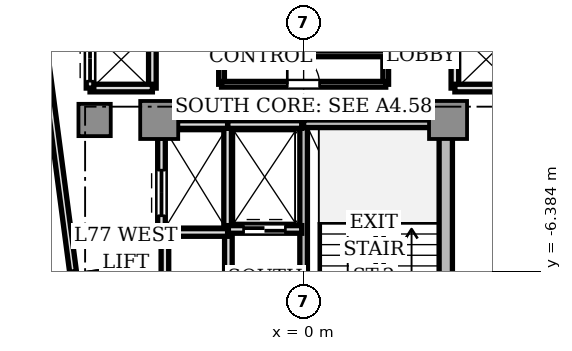
"""IFC4 building model, lengths in metres.
Left out: names, types, materials, properties, quantities, classifications, styles, units other than length and angle.
Written with IfcOpenShell. Run it as: python <this file> out.ifc"""

import sys

from ifc_helpers import new_model, si_unit, direction, frame, frame_2d, origin, origin_2d, place, context, subcontext, project, spatial, rectangle, extrude, source, transform, mapped, element, fill, save


model = new_model("IFC4")
c1 = context("Model", 3, precision=1e-05, world=origin(), true_north=direction((0.0, 1.0)))
c2 = subcontext(c1, "Body", "Model", "MODEL_VIEW")
j1 = project(units=[si_unit("LENGTHUNIT", "METRE"), si_unit("PLANEANGLEUNIT", "RADIAN")], contexts=[c1])
p1 = place(None, origin())
s1 = spatial("IfcSite", under=j1, at=p1, CompositionType="ELEMENT")
p2 = place(p1, origin())
s2 = spatial("IfcBuilding", under=s1, at=p2, CompositionType="ELEMENT")
p3 = place(p2, frame((0.0, 0.0, 275.8)))
s3 = spatial("IfcBuildingStorey", under=s2, at=p3, CompositionType="ELEMENT", Elevation=275.8)
p4 = place(p3, frame((3.74, -9.75, 0.0), z_axis=(0.0, 0.0, 1.0), x_axis=(0.0, 1.0, 0.0)))
e1 = element("IfcWall", 1, at=p4, inside=s3, PredefinedType="SHEAR", context=c2, shape_type="SweptSolid", body=[
    extrude(rectangle(XDim=6.9, YDim=0.35, at=frame_2d((3.45, 0.0))), origin(), (0.0, 0.0, 1.0), 4.1),
])
m1 = source(origin(), c2, "Body", "SweptSolid", [
    extrude(rectangle(XDim=1.0, YDim=1.0, at=origin_2d()), origin(), (0.0, 0.0, 1.0), 4.1),
])
for number, where, z_axis, x_axis in (
    (2, (-3.8, -2.4, 0.0), (0.0, 0.0, 1.0), (1.0, 0.0, 0.0)),
    (3, (3.8, -2.4, 0.0), (0.0, 0.0, 1.0), (1.0, 0.0, 0.0)),
):
    element("IfcColumn", number, at=place(p3, frame(where, z_axis=z_axis, x_axis=x_axis)), inside=s3, PredefinedType="COLUMN", context=c2, shape_type="MappedRepresentation", body=[
        mapped(m1, transform((0.0, 0.0, 0.0), scale=1.0)),
    ])
m2 = source(origin(), c2, "Body", "SweptSolid", [
    extrude(rectangle(XDim=0.85, YDim=0.85, at=origin_2d()), origin(), (0.0, 0.0, 1.0), 4.1),
])
p5 = place(p3, frame((-5.5, -2.4, 0.0), z_axis=(0.0, 0.0, 1.0), x_axis=(1.0, 0.0, 0.0)))
e4 = element("IfcColumn", 4, at=p5, inside=s3, PredefinedType="COLUMN", context=c2, shape_type="MappedRepresentation", body=[
    mapped(m2, transform((0.0, 0.0, 0.0), scale=1.0)),
])
p6 = place(p3, frame((-4.821, -6.283, 0.0), z_axis=(0.0, 0.0, 1.0), x_axis=(0.130475563272, -0.991451525486, 0.0)))
e5 = element("IfcWall", 5, at=p6, inside=s3, PredefinedType="STANDARD", context=c2, shape_type="SweptSolid", body=[
    extrude(rectangle(XDim=2.7, YDim=0.22, at=frame_2d((1.35, 0.0))), origin(), (0.0, 0.0, 1.0), 4.1),
])
p7 = place(p6, frame((1.4, 0.0, 0.0)))
e6 = element("IfcOpeningElement", 6, at=p7, cuts=e5, PredefinedType="OPENING", context=c2, shape_type="SweptSolid", body=[
    extrude(rectangle(XDim=1.0, YDim=2.2, at=frame_2d((0.5, 1.1))), frame((0.0, 0.12, 0.0), z_axis=(0.0, -1.0, 0.0), x_axis=(1.0, 0.0, 0.0)), (0.0, 0.0, 1.0), 0.24),
])
p8 = place(p3, frame((0.0, -10.18, 0.0), z_axis=(0.0, 0.0, 1.0), x_axis=(0.0, 1.0, 0.0)))
e7 = element("IfcWall", 7, at=p8, inside=s3, PredefinedType="SOLIDWALL", context=c2, shape_type="SweptSolid", body=[
    extrude(rectangle(XDim=7.68, YDim=0.2, at=frame_2d((3.84, 0.0))), origin(), (0.0, 0.0, 1.0), 4.1),
])
p9 = place(p8, frame((0.28, 0.0, 0.0)))
e8 = element("IfcOpeningElement", 8, at=p9, cuts=e7, PredefinedType="OPENING", context=c2, shape_type="SweptSolid", body=[
    extrude(rectangle(XDim=1.1, YDim=2.15, at=frame_2d((0.55, 1.075))), frame((0.0, 0.11, 0.0), z_axis=(0.0, -1.0, 0.0), x_axis=(1.0, 0.0, 0.0)), (0.0, 0.0, 1.0), 0.22),
])
p10 = place(p3, frame((0.0, -2.5, 0.0), z_axis=(0.0, 0.0, 1.0), x_axis=(1.0, 0.0, 0.0)))
e9 = element("IfcWall", 9, at=p10, inside=s3, PredefinedType="SOLIDWALL", context=c2, shape_type="SweptSolid", body=[
    extrude(rectangle(XDim=3.72, YDim=0.2, at=frame_2d((1.86, 0.0))), origin(), (0.0, 0.0, 1.0), 4.1),
])
p11 = place(p3, frame((-1.98, -9.98, 0.0), z_axis=(0.0, 0.0, 1.0), x_axis=(0.0, 1.0, 0.0)))
e10 = element("IfcWall", 10, at=p11, inside=s3, PredefinedType="SOLIDWALL", context=c2, shape_type="SweptSolid", body=[
    extrude(rectangle(XDim=4.66, YDim=0.2, at=frame_2d((2.33, 0.0))), origin(), (0.0, 0.0, 1.0), 3.65),
])
p12 = place(p11, frame((0.2, 0.0, 0.0)))
e11 = element("IfcOpeningElement", 11, at=p12, cuts=e10, PredefinedType="OPENING", context=c2, shape_type="SweptSolid", body=[
    extrude(rectangle(XDim=0.85, YDim=2.1, at=frame_2d((0.425, 1.05))), frame((0.0, 0.11, 0.0), z_axis=(0.0, -1.0, 0.0), x_axis=(1.0, 0.0, 0.0)), (0.0, 0.0, 1.0), 0.22),
])
p13 = place(p3, frame((-2.0, -5.28, 0.0), z_axis=(0.0, 0.0, 1.0), x_axis=(0.0, 1.0, 0.0)))
e12 = element("IfcWall", 12, at=p13, inside=s3, PredefinedType="SOLIDWALL", context=c2, shape_type="SweptSolid", body=[
    extrude(rectangle(XDim=2.78, YDim=0.2, at=frame_2d((1.39, 0.0))), origin(), (0.0, 0.0, 1.0), 3.65),
])
p14 = place(p3, frame((-2.0, -2.52, 0.0), z_axis=(0.0, 0.0, 1.0), x_axis=(1.0, 0.0, 0.0)))
e13 = element("IfcWall", 13, at=p14, inside=s3, PredefinedType="SOLIDWALL", context=c2, shape_type="SweptSolid", body=[
    extrude(rectangle(XDim=1.95, YDim=0.2, at=frame_2d((0.975, 0.0))), origin(), (0.0, 0.0, 1.0), 3.65),
])
p15 = place(p3, frame((-1.98, -5.28, 0.0), z_axis=(0.0, 0.0, 1.0), x_axis=(1.0, 0.0, 0.0)))
e14 = element("IfcWall", 14, at=p15, inside=s3, PredefinedType="SOLIDWALL", context=c2, shape_type="SweptSolid", body=[
    extrude(rectangle(XDim=1.93, YDim=0.2, at=frame_2d((0.965, 0.0))), origin(), (0.0, 0.0, 1.0), 3.65),
])
p16 = place(p15, frame((0.4, 0.0, 0.0)))
e15 = element("IfcOpeningElement", 15, at=p16, cuts=e14, PredefinedType="OPENING", context=c2, shape_type="SweptSolid", body=[
    extrude(rectangle(XDim=1.1, YDim=2.2, at=frame_2d((0.55, 1.1))), frame((0.0, 0.11, 0.0), z_axis=(0.0, -1.0, 0.0), x_axis=(1.0, 0.0, 0.0)), (0.0, 0.0, 1.0), 0.22),
])
p17 = place(p3, frame((-3.32, -2.52, 0.0), z_axis=(0.0, 0.0, 1.0), x_axis=(1.0, 0.0, 0.0)))
e16 = element("IfcWall", 16, at=p17, inside=s3, PredefinedType="SOLIDWALL", context=c2, shape_type="SweptSolid", body=[
    extrude(rectangle(XDim=1.32, YDim=0.2, at=frame_2d((0.66, 0.0))), origin(), (0.0, 0.0, 1.0), 3.65),
])
p18 = place(p3, frame((-3.74, -5.36, 0.0), z_axis=(0.0, 0.0, 1.0), x_axis=(1.0, 0.0, 0.0)))
e17 = element("IfcWall", 17, at=p18, inside=s3, PredefinedType="SOLIDWALL", context=c2, shape_type="SweptSolid", body=[
    extrude(rectangle(XDim=1.74, YDim=0.2, at=frame_2d((0.87, 0.0))), origin(), (0.0, 0.0, 1.0), 3.65),
])
p19 = place(p3, frame((-3.74, -5.36, 0.0), z_axis=(0.0, 0.0, 1.0), x_axis=(0.0, 1.0, 0.0)))
e18 = element("IfcWall", 18, at=p19, inside=s3, PredefinedType="SOLIDWALL", context=c2, shape_type="SweptSolid", body=[
    extrude(rectangle(XDim=2.48, YDim=0.2, at=frame_2d((1.24, 0.0))), origin(), (0.0, 0.0, 1.0), 3.65),
])
p20 = place(p19, frame((0.44, 0.0, 0.0)))
e19 = element("IfcOpeningElement", 19, at=p20, cuts=e18, PredefinedType="OPENING", context=c2, shape_type="SweptSolid", body=[
    extrude(rectangle(XDim=1.2, YDim=2.2, at=frame_2d((0.6, 1.1))), frame((0.0, 0.11, 0.0), z_axis=(0.0, -1.0, 0.0), x_axis=(1.0, 0.0, 0.0)), (0.0, 0.0, 1.0), 0.22),
])
p21 = place(p3, frame((3.98, -1.56, 0.0), z_axis=(0.0, 0.0, 1.0), x_axis=(0.0, 1.0, 0.0)))
e20 = element("IfcWall", 20, at=p21, inside=s3, PredefinedType="SOLIDWALL", context=c2, shape_type="SweptSolid", body=[
    extrude(rectangle(XDim=3.12, YDim=0.2, at=frame_2d((1.56, 0.0))), origin(), (0.0, 0.0, 1.0), 3.32),
])
p22 = place(p3, frame((3.98, -1.56, 0.0), z_axis=(0.0, 0.0, 1.0), x_axis=(1.0, 0.0, 0.0)))
e21 = element("IfcWall", 21, at=p22, inside=s3, PredefinedType="SOLIDWALL", context=c2, shape_type="SweptSolid", body=[
    extrude(rectangle(XDim=1.64, YDim=0.2, at=frame_2d((0.82, 0.0))), origin(), (0.0, 0.0, 1.0), 3.65),
])
p23 = place(p3, frame((-3.98, -1.56, 0.0), z_axis=(0.0, 0.0, 1.0), x_axis=(0.0, 1.0, 0.0)))
e22 = element("IfcWall", 22, at=p23, inside=s3, PredefinedType="SOLIDWALL", context=c2, shape_type="SweptSolid", body=[
    extrude(rectangle(XDim=3.12, YDim=0.2, at=frame_2d((1.56, 0.0))), origin(), (0.0, 0.0, 1.0), 3.32),
])
p24 = place(p3, frame((-5.62, -1.56, 0.0), z_axis=(0.0, 0.0, 1.0), x_axis=(1.0, 0.0, 0.0)))
e23 = element("IfcWall", 23, at=p24, inside=s3, PredefinedType="SOLIDWALL", context=c2, shape_type="SweptSolid", body=[
    extrude(rectangle(XDim=1.64, YDim=0.2, at=frame_2d((0.82, 0.0))), origin(), (0.0, 0.0, 1.0), 3.65),
])
p25 = place(p3, frame((-5.62, -1.56, 0.0), z_axis=(0.0, 0.0, 1.0), x_axis=(0.0, 1.0, 0.0)))
e24 = element("IfcWall", 24, at=p25, inside=s3, PredefinedType="SOLIDWALL", context=c2, shape_type="SweptSolid", body=[
    extrude(rectangle(XDim=1.56, YDim=0.2, at=frame_2d((0.78, 0.0))), origin(), (0.0, 0.0, 1.0), 3.65),
])
p26 = place(p25, frame((0.18, 0.0, 0.0)))
e25 = element("IfcOpeningElement", 25, at=p26, cuts=e24, PredefinedType="OPENING", context=c2, shape_type="SweptSolid", body=[
    extrude(rectangle(XDim=1.2, YDim=2.2, at=frame_2d((0.6, 1.1))), frame((0.0, 0.11, 0.0), z_axis=(0.0, -1.0, 0.0), x_axis=(1.0, 0.0, 0.0)), (0.0, 0.0, 1.0), 0.22),
])
p27 = place(p3, frame((-3.65, -8.81, 0.0), z_axis=(0.0, 0.0, 1.0), x_axis=(0.0, 1.0, 0.0)))
e26 = element("IfcWall", 26, at=p27, inside=s3, PredefinedType="SOLIDWALL", context=c2, shape_type="SweptSolid", body=[
    extrude(rectangle(XDim=3.43, YDim=0.2, at=frame_2d((1.715, 0.0))), origin(), (0.0, 0.0, 1.0), 3.65),
])
p28 = place(p27, frame((1.2, 0.0, 0.0)))
e27 = element("IfcOpeningElement", 27, at=p28, cuts=e26, PredefinedType="OPENING", context=c2, shape_type="SweptSolid", body=[
    extrude(rectangle(XDim=0.95, YDim=2.15, at=frame_2d((0.475, 1.075))), frame((0.0, 0.11, 0.0), z_axis=(0.0, -1.0, 0.0), x_axis=(1.0, 0.0, 0.0)), (0.0, 0.0, 1.0), 0.22),
])
p29 = place(p3, frame((2.16, -1.46, 0.0), z_axis=(0.0, 0.0, 1.0), x_axis=(0.0, 1.0, 0.0)))
e28 = element("IfcWall", 28, at=p29, inside=s3, PredefinedType="PARTITIONING", context=c2, shape_type="SweptSolid", body=[
    extrude(rectangle(XDim=2.92, YDim=0.15, at=frame_2d((1.46, 0.0))), origin(), (0.0, 0.0, 1.0), 3.65),
])
p30 = place(p29, frame((1.035, 0.0, 0.0)))
e29 = element("IfcOpeningElement", 29, at=p30, cuts=e28, PredefinedType="OPENING", context=c2, shape_type="SweptSolid", body=[
    extrude(rectangle(XDim=0.85, YDim=2.1, at=frame_2d((0.425, 1.05))), frame((0.0, 0.085, 0.0), z_axis=(0.0, -1.0, 0.0), x_axis=(1.0, 0.0, 0.0)), (0.0, 0.0, 1.0), 0.17),
])
p31 = place(p3, frame((-2.16, -1.46, 0.0), z_axis=(0.0, 0.0, 1.0), x_axis=(0.0, 1.0, 0.0)))
e30 = element("IfcWall", 30, at=p31, inside=s3, PredefinedType="PARTITIONING", context=c2, shape_type="SweptSolid", body=[
    extrude(rectangle(XDim=2.92, YDim=0.15, at=frame_2d((1.46, 0.0))), origin(), (0.0, 0.0, 1.0), 3.65),
])
p32 = place(p3, frame((-2.16, -1.46, 0.0), z_axis=(0.0, 0.0, 1.0), x_axis=(1.0, 0.0, 0.0)))
e31 = element("IfcWall", 31, at=p32, inside=s3, PredefinedType="PARTITIONING", context=c2, shape_type="SweptSolid", body=[
    extrude(rectangle(XDim=4.32, YDim=0.15, at=frame_2d((2.16, 0.0))), origin(), (0.0, 0.0, 1.0), 3.65),
])
p33 = place(p32, frame((1.73, 0.0, 0.0)))
e32 = element("IfcOpeningElement", 32, at=p33, cuts=e31, PredefinedType="OPENING", context=c2, shape_type="SweptSolid", body=[
    extrude(rectangle(XDim=0.85, YDim=2.1, at=frame_2d((0.425, 1.05))), frame((0.0, 0.085, 0.0), z_axis=(0.0, -1.0, 0.0), x_axis=(1.0, 0.0, 0.0)), (0.0, 0.0, 1.0), 0.17),
])
p34 = place(p3, frame((-2.16, -0.66, 0.0), z_axis=(0.0, 0.0, 1.0), x_axis=(1.0, 0.0, 0.0)))
e33 = element("IfcWall", 33, at=p34, inside=s3, PredefinedType="PARTITIONING", context=c2, shape_type="SweptSolid", body=[
    extrude(rectangle(XDim=4.32, YDim=0.15, at=frame_2d((2.16, 0.0))), origin(), (0.0, 0.0, 1.0), 3.65),
])
p35 = place(p3, frame((-7.229, 2.427, 0.0), z_axis=(0.0, 0.0, 1.0), x_axis=(0.130548179903, -0.991441966392, 0.0)))
e34 = element("IfcWall", 34, at=p35, inside=s3, PredefinedType="PARTITIONING", context=c2, shape_type="SweptSolid", body=[
    extrude(rectangle(XDim=8.9, YDim=0.18, at=frame_2d((4.45, 0.0))), origin(), (0.0, 0.0, 1.0), 3.65),
])
m3 = source(origin(), c2, "Body", "SweptSolid", [
    extrude(rectangle(XDim=1.1, YDim=0.05, at=origin_2d()), origin(), (0.0, 0.0, 1.0), 2.2),
])
p36 = place(p16, frame((0.55, 0.0, 0.0)))
e35 = element("IfcDoor", 35, at=p36, inside=s3, OperationType="DOUBLE_DOOR_SLIDING", PredefinedType="DOOR", context=c2, shape_type="MappedRepresentation", body=[
    mapped(m3, transform((0.0, 0.0, 0.0), scale=1.0)),
])
fill(e15, e35)
m4 = source(origin(), c2, "Body", "SweptSolid", [
    extrude(rectangle(XDim=1.2, YDim=0.05, at=origin_2d()), origin(), (0.0, 0.0, 1.0), 2.2),
])
p37 = place(p20, frame((0.6, 0.0, 0.0)))
e36 = element("IfcDoor", 36, at=p37, inside=s3, OperationType="DOUBLE_DOOR_SLIDING", PredefinedType="DOOR", context=c2, shape_type="MappedRepresentation", body=[
    mapped(m4, transform((0.0, 0.0, 0.0), scale=1.0)),
])
fill(e19, e36)
p38 = place(p26, frame((0.6, 0.0, 0.0)))
e37 = element("IfcDoor", 37, at=p38, inside=s3, OperationType="DOUBLE_DOOR_SLIDING", PredefinedType="DOOR", context=c2, shape_type="MappedRepresentation", body=[
    mapped(m4, transform((0.0, 0.0, 0.0), scale=1.0)),
])
fill(e25, e37)
m5 = source(origin(), c2, "Body", "SweptSolid", [
    extrude(rectangle(XDim=0.85, YDim=0.05, at=origin_2d()), origin(), (0.0, 0.0, 1.0), 2.1),
])
p39 = place(p33, frame((0.425, 0.0, 0.0)))
e38 = element("IfcDoor", 38, at=p39, inside=s3, OperationType="SINGLE_SWING_LEFT", PredefinedType="DOOR", context=c2, shape_type="MappedRepresentation", body=[
    mapped(m5, transform((0.0, 0.0, 0.0), scale=1.0)),
])
fill(e32, e38)
save(model, sys.argv[1])
